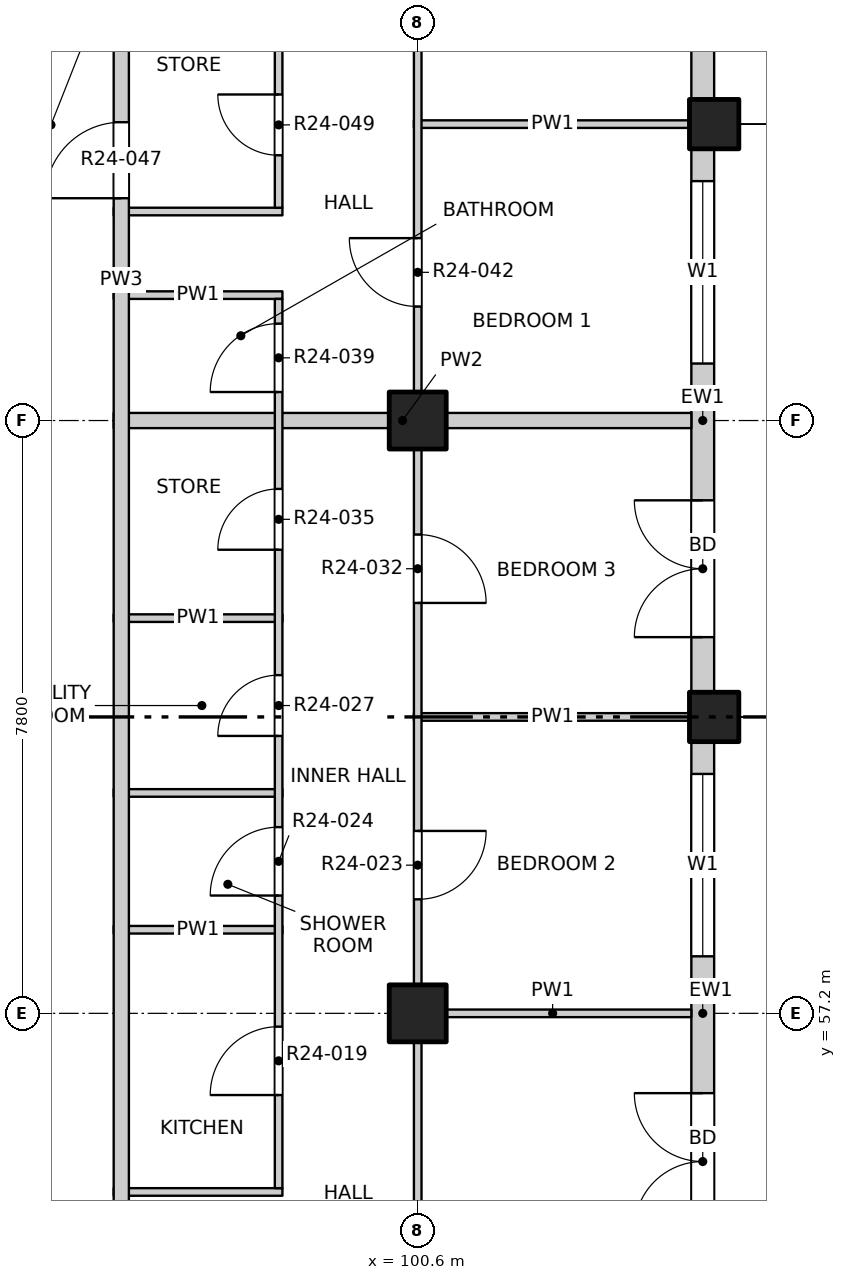
"""IFC4 building model, lengths in metres.
Left out: names, types, materials, properties, quantities, classifications, styles, units other than length and angle.
Written with IfcOpenShell. Run it as: python <this file> out.ifc"""

import sys

from ifc_helpers import new_model, si_unit, direction, frame, frame_2d, origin, origin_2d, place, context, subcontext, project, spatial, rectangle, extrude, element, fill, save


model = new_model("IFC4")
c1 = context("Model", 3, precision=1e-05, world=origin(), true_north=direction((0.0, 1.0)))
c2 = subcontext(c1, "Body", "Model", "MODEL_VIEW")
j1 = project(units=[si_unit("LENGTHUNIT", "METRE"), si_unit("PLANEANGLEUNIT", "RADIAN")], contexts=[c1])
p1 = place(None, origin())
s1 = spatial("IfcSite", under=j1, at=p1, CompositionType="ELEMENT")
p2 = place(p1, origin())
s2 = spatial("IfcBuilding", under=s1, at=p2, CompositionType="ELEMENT")
p3 = place(p2, frame((0.0, 0.0, 246.0)))
s3 = spatial("IfcBuildingStorey", under=s2, at=p3, CompositionType="ELEMENT", Elevation=246.0)
for number, where, z_axis, x_axis in (
    (1, (104.5, 61.1, -0.3), (0.0, 0.0, 1.0), (1.0, 0.0, 0.0)),
    (2, (104.5, 68.9, -0.3), (0.0, 0.0, 1.0), (1.0, 0.0, 0.0)),
):
    element("IfcColumn", number, at=place(p3, frame(where, z_axis=z_axis, x_axis=x_axis)), inside=s3, PredefinedType="COLUMN", context=c2, shape_type="SweptSolid", body=[
        extrude(rectangle(XDim=0.65, YDim=0.65, at=origin_2d()), origin(), (0.0, 0.0, 1.0), 3.45),
    ])
for number, where, z_axis, x_axis in (
    (3, (100.6, 57.2, -0.3), (0.0, 0.0, 1.0), (1.0, 0.0, 0.0)),
    (4, (100.6, 65.0, -0.3), (0.0, 0.0, 1.0), (1.0, 0.0, 0.0)),
):
    element("IfcColumn", number, at=place(p3, frame(where, z_axis=z_axis, x_axis=x_axis)), inside=s3, PredefinedType="COLUMN", context=c2, shape_type="SweptSolid", body=[
        extrude(rectangle(XDim=0.75, YDim=0.75, at=origin_2d()), origin(), (0.0, 0.0, 1.0), 3.45),
    ])
p4 = place(p3, frame((104.35, 53.625, 0.0), z_axis=(0.0, 0.0, 1.0), x_axis=(0.0, 1.0, 0.0)))
e5 = element("IfcWall", 5, at=p4, inside=s3, PredefinedType="SOLIDWALL", context=c2, shape_type="SweptSolid", body=[
    extrude(rectangle(XDim=7.15, YDim=0.3, at=frame_2d((3.575, 0.0))), origin(), (0.0, 0.0, 1.0), 2.7),
])
p5 = place(p4, frame((0.725, 0.0, 0.0)))
e6 = element("IfcOpeningElement", 6, at=p5, cuts=e5, PredefinedType="OPENING", context=c2, shape_type="SweptSolid", body=[
    extrude(rectangle(XDim=1.8, YDim=2.4, at=frame_2d((0.9, 1.2))), frame((0.0, 0.16, 0.0), z_axis=(0.0, -1.0, 0.0), x_axis=(1.0, 0.0, 0.0)), (0.0, 0.0, 1.0), 0.32),
])
p6 = place(p4, frame((4.325, 0.0, 0.9)))
e7 = element("IfcOpeningElement", 7, at=p6, cuts=e5, PredefinedType="OPENING", context=c2, shape_type="SweptSolid", body=[
    extrude(rectangle(XDim=2.4, YDim=1.8, at=frame_2d((1.2, 0.9))), frame((0.0, 0.16, 0.0), z_axis=(0.0, -1.0, 0.0), x_axis=(1.0, 0.0, 0.0)), (0.0, 0.0, 1.0), 0.32),
])
p7 = place(p3, frame((104.35, 61.425, 0.0), z_axis=(0.0, 0.0, 1.0), x_axis=(0.0, 1.0, 0.0)))
e8 = element("IfcWall", 8, at=p7, inside=s3, PredefinedType="SOLIDWALL", context=c2, shape_type="SweptSolid", body=[
    extrude(rectangle(XDim=7.15, YDim=0.3, at=frame_2d((3.575, 0.0))), origin(), (0.0, 0.0, 1.0), 2.7),
])
p8 = place(p7, frame((0.725, 0.0, 0.0)))
e9 = element("IfcOpeningElement", 9, at=p8, cuts=e8, PredefinedType="OPENING", context=c2, shape_type="SweptSolid", body=[
    extrude(rectangle(XDim=1.8, YDim=2.4, at=frame_2d((0.9, 1.2))), frame((0.0, 0.16, 0.0), z_axis=(0.0, -1.0, 0.0), x_axis=(1.0, 0.0, 0.0)), (0.0, 0.0, 1.0), 0.32),
])
p9 = place(p7, frame((4.325, 0.0, 0.9)))
e10 = element("IfcOpeningElement", 10, at=p9, cuts=e8, PredefinedType="OPENING", context=c2, shape_type="SweptSolid", body=[
    extrude(rectangle(XDim=2.4, YDim=1.8, at=frame_2d((1.2, 0.9))), frame((0.0, 0.16, 0.0), z_axis=(0.0, -1.0, 0.0), x_axis=(1.0, 0.0, 0.0)), (0.0, 0.0, 1.0), 0.32),
])
p10 = place(p3, frame((104.35, 69.225, 0.0), z_axis=(0.0, 0.0, 1.0), x_axis=(0.0, 1.0, 0.0)))
e11 = element("IfcWall", 11, at=p10, inside=s3, PredefinedType="SOLIDWALL", context=c2, shape_type="SweptSolid", body=[
    extrude(rectangle(XDim=7.15, YDim=0.3, at=frame_2d((3.575, 0.0))), origin(), (0.0, 0.0, 1.0), 2.7),
])
p11 = place(p10, frame((0.725, 0.0, 0.0)))
e12 = element("IfcOpeningElement", 12, at=p11, cuts=e11, PredefinedType="OPENING", context=c2, shape_type="SweptSolid", body=[
    extrude(rectangle(XDim=1.8, YDim=2.4, at=frame_2d((0.9, 1.2))), frame((0.0, 0.16, 0.0), z_axis=(0.0, -1.0, 0.0), x_axis=(1.0, 0.0, 0.0)), (0.0, 0.0, 1.0), 0.32),
])
p12 = place(p10, frame((4.325, 0.0, 0.9)))
e13 = element("IfcOpeningElement", 13, at=p12, cuts=e11, PredefinedType="OPENING", context=c2, shape_type="SweptSolid", body=[
    extrude(rectangle(XDim=2.4, YDim=1.8, at=frame_2d((1.2, 0.9))), frame((0.0, 0.16, 0.0), z_axis=(0.0, -1.0, 0.0), x_axis=(1.0, 0.0, 0.0)), (0.0, 0.0, 1.0), 0.32),
])
p13 = place(p3, frame((96.6, 54.85, 0.0), z_axis=(0.0, 0.0, 1.0), x_axis=(1.0, 0.0, 0.0)))
e14 = element("IfcWall", 14, at=p13, inside=s3, PredefinedType="PARTITIONING", context=c2, shape_type="SweptSolid", body=[
    extrude(rectangle(XDim=2.22, YDim=0.1, at=frame_2d((1.11, 0.0))), origin(), (0.0, 0.0, 1.0), 3.15),
])
p14 = place(p3, frame((100.55, 57.2, 0.0), z_axis=(0.0, 0.0, 1.0), x_axis=(1.0, 0.0, 0.0)))
e15 = element("IfcWall", 15, at=p14, inside=s3, PredefinedType="PARTITIONING", context=c2, shape_type="SweptSolid", body=[
    extrude(rectangle(XDim=3.65, YDim=0.1, at=frame_2d((1.825, 0.0))), origin(), (0.0, 0.0, 1.0), 3.15),
])
for number, where, z_axis, x_axis in (
    (16, (96.6, 58.3, 0.0), (0.0, 0.0, 1.0), (1.0, 0.0, 0.0)),
    (17, (96.6, 60.1, 0.0), (0.0, 0.0, 1.0), (1.0, 0.0, 0.0)),
):
    element("IfcWall", number, at=place(p3, frame(where, z_axis=z_axis, x_axis=x_axis)), inside=s3, PredefinedType="PARTITIONING", context=c2, shape_type="SweptSolid", body=[
        extrude(rectangle(XDim=2.22, YDim=0.1, at=frame_2d((1.11, 0.0))), origin(), (0.0, 0.0, 1.0), 3.15),
    ])
p15 = place(p3, frame((100.55, 61.1, 0.0), z_axis=(0.0, 0.0, 1.0), x_axis=(1.0, 0.0, 0.0)))
e18 = element("IfcWall", 18, at=p15, inside=s3, PredefinedType="PARTITIONING", context=c2, shape_type="SweptSolid", body=[
    extrude(rectangle(XDim=3.65, YDim=0.1, at=frame_2d((1.825, 0.0))), origin(), (0.0, 0.0, 1.0), 2.55),
])
p16 = place(p3, frame((96.6, 62.4, 0.0), z_axis=(0.0, 0.0, 1.0), x_axis=(1.0, 0.0, 0.0)))
e19 = element("IfcWall", 19, at=p16, inside=s3, PredefinedType="PARTITIONING", context=c2, shape_type="SweptSolid", body=[
    extrude(rectangle(XDim=2.22, YDim=0.1, at=frame_2d((1.11, 0.0))), origin(), (0.0, 0.0, 1.0), 3.15),
])
p17 = place(p3, frame((96.6, 65.0, 0.0), z_axis=(0.0, 0.0, 1.0), x_axis=(1.0, 0.0, 0.0)))
e20 = element("IfcWall", 20, at=p17, inside=s3, PredefinedType="PARTITIONING", context=c2, shape_type="SweptSolid", body=[
    extrude(rectangle(XDim=7.6, YDim=0.2, at=frame_2d((3.8, 0.0))), origin(), (0.0, 0.0, 1.0), 3.15),
])
for number, where, z_axis, x_axis in (
    (21, (96.6, 66.65, 0.0), (0.0, 0.0, 1.0), (1.0, 0.0, 0.0)),
    (22, (96.6, 67.75, 0.0), (0.0, 0.0, 1.0), (1.0, 0.0, 0.0)),
):
    element("IfcWall", number, at=place(p3, frame(where, z_axis=z_axis, x_axis=x_axis)), inside=s3, PredefinedType="PARTITIONING", context=c2, shape_type="SweptSolid", body=[
        extrude(rectangle(XDim=2.22, YDim=0.1, at=frame_2d((1.11, 0.0))), origin(), (0.0, 0.0, 1.0), 3.15),
    ])
p18 = place(p3, frame((100.55, 68.9, 0.0), z_axis=(0.0, 0.0, 1.0), x_axis=(1.0, 0.0, 0.0)))
e23 = element("IfcWall", 23, at=p18, inside=s3, PredefinedType="PARTITIONING", context=c2, shape_type="SweptSolid", body=[
    extrude(rectangle(XDim=3.65, YDim=0.1, at=frame_2d((1.825, 0.0))), origin(), (0.0, 0.0, 1.0), 2.55),
])
p19 = place(p3, frame((96.7, 49.5, 0.0), z_axis=(0.0, 0.0, 1.0), x_axis=(0.0, 1.0, 0.0)))
e24 = element("IfcWall", 24, at=p19, inside=s3, PredefinedType="PARTITIONING", context=c2, shape_type="SweptSolid", body=[
    extrude(rectangle(XDim=34.7, YDim=0.2, at=frame_2d((17.35, 0.0))), origin(), (0.0, 0.0, 1.0), 3.15),
])
p20 = place(p19, frame((3.075, 0.0, 0.0)))
e25 = element("IfcOpeningElement", 25, at=p20, cuts=e24, PredefinedType="OPENING", context=c2, shape_type="SweptSolid", body=[
    extrude(rectangle(XDim=1.0, YDim=2.1, at=frame_2d((0.5, 1.05))), frame((0.0, 0.11, 0.0), z_axis=(0.0, -1.0, 0.0), x_axis=(1.0, 0.0, 0.0)), (0.0, 0.0, 1.0), 0.22),
])
p21 = place(p19, frame((18.425, 0.0, 0.0)))
e26 = element("IfcOpeningElement", 26, at=p21, cuts=e24, PredefinedType="OPENING", context=c2, shape_type="SweptSolid", body=[
    extrude(rectangle(XDim=1.0, YDim=2.1, at=frame_2d((0.5, 1.05))), frame((0.0, 0.11, 0.0), z_axis=(0.0, -1.0, 0.0), x_axis=(1.0, 0.0, 0.0)), (0.0, 0.0, 1.0), 0.22),
])
p22 = place(p19, frame((25.825, 0.0, 0.0)))
e27 = element("IfcOpeningElement", 27, at=p22, cuts=e24, PredefinedType="OPENING", context=c2, shape_type="SweptSolid", body=[
    extrude(rectangle(XDim=1.0, YDim=2.1, at=frame_2d((0.5, 1.05))), frame((0.0, 0.11, 0.0), z_axis=(0.0, -1.0, 0.0), x_axis=(1.0, 0.0, 0.0)), (0.0, 0.0, 1.0), 0.22),
])
p23 = place(p3, frame((98.77, 54.9, 0.0), z_axis=(0.0, 0.0, 1.0), x_axis=(0.0, 1.0, 0.0)))
e28 = element("IfcWall", 28, at=p23, inside=s3, PredefinedType="PARTITIONING", context=c2, shape_type="SweptSolid", body=[
    extrude(rectangle(XDim=11.7, YDim=0.1, at=frame_2d((5.85, 0.0))), origin(), (0.0, 0.0, 1.0), 3.15),
])
p24 = place(p23, frame((1.225, 0.0, 0.0)))
e29 = element("IfcOpeningElement", 29, at=p24, cuts=e28, PredefinedType="OPENING", context=c2, shape_type="SweptSolid", body=[
    extrude(rectangle(XDim=0.9, YDim=2.1, at=frame_2d((0.45, 1.05))), frame((0.0, 0.06, 0.0), z_axis=(0.0, -1.0, 0.0), x_axis=(1.0, 0.0, 0.0)), (0.0, 0.0, 1.0), 0.12),
])
p25 = place(p23, frame((3.85, 0.0, 0.0)))
e30 = element("IfcOpeningElement", 30, at=p25, cuts=e28, PredefinedType="OPENING", context=c2, shape_type="SweptSolid", body=[
    extrude(rectangle(XDim=0.9, YDim=2.1, at=frame_2d((0.45, 1.05))), frame((0.0, 0.06, 0.0), z_axis=(0.0, -1.0, 0.0), x_axis=(1.0, 0.0, 0.0)), (0.0, 0.0, 1.0), 0.12),
])
p26 = place(p23, frame((5.95, 0.0, 0.0)))
e31 = element("IfcOpeningElement", 31, at=p26, cuts=e28, PredefinedType="OPENING", context=c2, shape_type="SweptSolid", body=[
    extrude(rectangle(XDim=0.8, YDim=2.1, at=frame_2d((0.4, 1.05))), frame((0.0, 0.06, 0.0), z_axis=(0.0, -1.0, 0.0), x_axis=(1.0, 0.0, 0.0)), (0.0, 0.0, 1.0), 0.12),
])
p27 = place(p23, frame((8.4, 0.0, 0.0)))
e32 = element("IfcOpeningElement", 32, at=p27, cuts=e28, PredefinedType="OPENING", context=c2, shape_type="SweptSolid", body=[
    extrude(rectangle(XDim=0.8, YDim=2.1, at=frame_2d((0.4, 1.05))), frame((0.0, 0.06, 0.0), z_axis=(0.0, -1.0, 0.0), x_axis=(1.0, 0.0, 0.0)), (0.0, 0.0, 1.0), 0.12),
])
p28 = place(p23, frame((10.475, 0.0, 0.0)))
e33 = element("IfcOpeningElement", 33, at=p28, cuts=e28, PredefinedType="OPENING", context=c2, shape_type="SweptSolid", body=[
    extrude(rectangle(XDim=0.9, YDim=2.1, at=frame_2d((0.45, 1.05))), frame((0.0, 0.06, 0.0), z_axis=(0.0, -1.0, 0.0), x_axis=(1.0, 0.0, 0.0)), (0.0, 0.0, 1.0), 0.12),
])
p29 = place(p3, frame((98.77, 67.8, 0.0), z_axis=(0.0, 0.0, 1.0), x_axis=(0.0, 1.0, 0.0)))
e34 = element("IfcWall", 34, at=p29, inside=s3, PredefinedType="PARTITIONING", context=c2, shape_type="SweptSolid", body=[
    extrude(rectangle(XDim=6.2, YDim=0.1, at=frame_2d((3.1, 0.0))), origin(), (0.0, 0.0, 1.0), 3.15),
])
p30 = place(p29, frame((0.69, 0.0, 0.0)))
e35 = element("IfcOpeningElement", 35, at=p30, cuts=e34, PredefinedType="OPENING", context=c2, shape_type="SweptSolid", body=[
    extrude(rectangle(XDim=0.8, YDim=2.1, at=frame_2d((0.4, 1.05))), frame((0.0, 0.06, 0.0), z_axis=(0.0, -1.0, 0.0), x_axis=(1.0, 0.0, 0.0)), (0.0, 0.0, 1.0), 0.12),
])
p31 = place(p29, frame((3.165, 0.0, 0.0)))
e36 = element("IfcOpeningElement", 36, at=p31, cuts=e34, PredefinedType="OPENING", context=c2, shape_type="SweptSolid", body=[
    extrude(rectangle(XDim=0.9, YDim=2.1, at=frame_2d((0.45, 1.05))), frame((0.0, 0.06, 0.0), z_axis=(0.0, -1.0, 0.0), x_axis=(1.0, 0.0, 0.0)), (0.0, 0.0, 1.0), 0.12),
])
p32 = place(p29, frame((5.225, 0.0, 0.0)))
e37 = element("IfcOpeningElement", 37, at=p32, cuts=e34, PredefinedType="OPENING", context=c2, shape_type="SweptSolid", body=[
    extrude(rectangle(XDim=0.8, YDim=2.1, at=frame_2d((0.4, 1.05))), frame((0.0, 0.06, 0.0), z_axis=(0.0, -1.0, 0.0), x_axis=(1.0, 0.0, 0.0)), (0.0, 0.0, 1.0), 0.12),
])
p33 = place(p3, frame((100.6, 45.8, 0.0), z_axis=(0.0, 0.0, 1.0), x_axis=(0.0, 1.0, 0.0)))
e38 = element("IfcWall", 38, at=p33, inside=s3, PredefinedType="PARTITIONING", context=c2, shape_type="SweptSolid", body=[
    extrude(rectangle(XDim=38.4, YDim=0.1, at=frame_2d((19.2, 0.0))), origin(), (0.0, 0.0, 1.0), 3.15),
])
p34 = place(p33, frame((1.05, 0.0, 0.0)))
e39 = element("IfcOpeningElement", 39, at=p34, cuts=e38, PredefinedType="OPENING", context=c2, shape_type="SweptSolid", body=[
    extrude(rectangle(XDim=1.2, YDim=2.1, at=frame_2d((0.6, 1.05))), frame((0.0, 0.06, 0.0), z_axis=(0.0, -1.0, 0.0), x_axis=(1.0, 0.0, 0.0)), (0.0, 0.0, 1.0), 0.12),
])
p35 = place(p33, frame((6.9, 0.0, 0.0)))
e40 = element("IfcOpeningElement", 40, at=p35, cuts=e38, PredefinedType="OPENING", context=c2, shape_type="SweptSolid", body=[
    extrude(rectangle(XDim=1.2, YDim=2.1, at=frame_2d((0.6, 1.05))), frame((0.0, 0.06, 0.0), z_axis=(0.0, -1.0, 0.0), x_axis=(1.0, 0.0, 0.0)), (0.0, 0.0, 1.0), 0.12),
])
p36 = place(p33, frame((12.9, 0.0, 0.0)))
e41 = element("IfcOpeningElement", 41, at=p36, cuts=e38, PredefinedType="OPENING", context=c2, shape_type="SweptSolid", body=[
    extrude(rectangle(XDim=0.9, YDim=2.1, at=frame_2d((0.45, 1.05))), frame((0.0, 0.06, 0.0), z_axis=(0.0, -1.0, 0.0), x_axis=(1.0, 0.0, 0.0)), (0.0, 0.0, 1.0), 0.12),
])
p37 = place(p33, frame((16.8, 0.0, 0.0)))
e42 = element("IfcOpeningElement", 42, at=p37, cuts=e38, PredefinedType="OPENING", context=c2, shape_type="SweptSolid", body=[
    extrude(rectangle(XDim=0.9, YDim=2.1, at=frame_2d((0.45, 1.05))), frame((0.0, 0.06, 0.0), z_axis=(0.0, -1.0, 0.0), x_axis=(1.0, 0.0, 0.0)), (0.0, 0.0, 1.0), 0.12),
])
p38 = place(p33, frame((20.7, 0.0, 0.0)))
e43 = element("IfcOpeningElement", 43, at=p38, cuts=e38, PredefinedType="OPENING", context=c2, shape_type="SweptSolid", body=[
    extrude(rectangle(XDim=0.9, YDim=2.1, at=frame_2d((0.45, 1.05))), frame((0.0, 0.06, 0.0), z_axis=(0.0, -1.0, 0.0), x_axis=(1.0, 0.0, 0.0)), (0.0, 0.0, 1.0), 0.12),
])
p39 = place(p33, frame((24.6, 0.0, 0.0)))
e44 = element("IfcOpeningElement", 44, at=p39, cuts=e38, PredefinedType="OPENING", context=c2, shape_type="SweptSolid", body=[
    extrude(rectangle(XDim=0.9, YDim=2.1, at=frame_2d((0.45, 1.05))), frame((0.0, 0.06, 0.0), z_axis=(0.0, -1.0, 0.0), x_axis=(1.0, 0.0, 0.0)), (0.0, 0.0, 1.0), 0.12),
])
p40 = place(p33, frame((30.3, 0.0, 0.0)))
e45 = element("IfcOpeningElement", 45, at=p40, cuts=e38, PredefinedType="OPENING", context=c2, shape_type="SweptSolid", body=[
    extrude(rectangle(XDim=1.2, YDim=2.1, at=frame_2d((0.6, 1.05))), frame((0.0, 0.06, 0.0), z_axis=(0.0, -1.0, 0.0), x_axis=(1.0, 0.0, 0.0)), (0.0, 0.0, 1.0), 0.12),
])
p41 = place(p33, frame((36.15, 0.0, 0.0)))
e46 = element("IfcOpeningElement", 46, at=p41, cuts=e38, PredefinedType="OPENING", context=c2, shape_type="SweptSolid", body=[
    extrude(rectangle(XDim=1.2, YDim=2.1, at=frame_2d((0.6, 1.05))), frame((0.0, 0.06, 0.0), z_axis=(0.0, -1.0, 0.0), x_axis=(1.0, 0.0, 0.0)), (0.0, 0.0, 1.0), 0.12),
])
p42 = place(p5, origin())
e47 = element("IfcDoor", 47, at=p42, inside=s3, OperationType="DOUBLE_DOOR_SINGLE_SWING", PredefinedType="DOOR", context=c2, shape_type="SweptSolid", body=[
    extrude(rectangle(XDim=1.8, YDim=2.4, at=frame_2d((0.9, 1.2))), frame((0.0, 0.025, 0.0), z_axis=(0.0, -1.0, 0.0), x_axis=(1.0, 0.0, 0.0)), (0.0, 0.0, 1.0), 0.05),
])
fill(e6, e47)
p43 = place(p6, origin())
e48 = element("IfcWindow", 48, at=p43, inside=s3, PartitioningType="DOUBLE_PANEL_VERTICAL", PredefinedType="WINDOW", context=c2, shape_type="SweptSolid", body=[
    extrude(rectangle(XDim=2.4, YDim=1.8, at=frame_2d((1.2, 0.9))), frame((0.0, 0.03, 0.0), z_axis=(0.0, -1.0, 0.0), x_axis=(1.0, 0.0, 0.0)), (0.0, 0.0, 1.0), 0.06),
])
fill(e7, e48)
p44 = place(p8, origin())
e49 = element("IfcDoor", 49, at=p44, inside=s3, OperationType="DOUBLE_DOOR_SINGLE_SWING", PredefinedType="DOOR", context=c2, shape_type="SweptSolid", body=[
    extrude(rectangle(XDim=1.8, YDim=2.4, at=frame_2d((0.9, 1.2))), frame((0.0, 0.025, 0.0), z_axis=(0.0, -1.0, 0.0), x_axis=(1.0, 0.0, 0.0)), (0.0, 0.0, 1.0), 0.05),
])
fill(e9, e49)
p45 = place(p9, origin())
e50 = element("IfcWindow", 50, at=p45, inside=s3, PartitioningType="DOUBLE_PANEL_VERTICAL", PredefinedType="WINDOW", context=c2, shape_type="SweptSolid", body=[
    extrude(rectangle(XDim=2.4, YDim=1.8, at=frame_2d((1.2, 0.9))), frame((0.0, 0.03, 0.0), z_axis=(0.0, -1.0, 0.0), x_axis=(1.0, 0.0, 0.0)), (0.0, 0.0, 1.0), 0.06),
])
fill(e10, e50)
p46 = place(p24, origin())
e51 = element("IfcDoor", 51, at=p46, inside=s3, OperationType="SINGLE_SWING_LEFT", PredefinedType="DOOR", context=c2, shape_type="SweptSolid", body=[
    extrude(rectangle(XDim=0.9, YDim=2.1, at=frame_2d((0.45, 1.05))), frame((0.0, 0.025, 0.0), z_axis=(0.0, -1.0, 0.0), x_axis=(1.0, 0.0, 0.0)), (0.0, 0.0, 1.0), 0.05),
])
fill(e29, e51)
p47 = place(p36, origin())
e52 = element("IfcDoor", 52, at=p47, inside=s3, OperationType="SINGLE_SWING_LEFT", PredefinedType="DOOR", context=c2, shape_type="SweptSolid", body=[
    extrude(rectangle(XDim=0.9, YDim=2.1, at=frame_2d((0.45, 1.05))), frame((0.0, 0.025, 0.0), z_axis=(0.0, -1.0, 0.0), x_axis=(1.0, 0.0, 0.0)), (0.0, 0.0, 1.0), 0.05),
])
fill(e41, e52)
p48 = place(p25, origin())
e53 = element("IfcDoor", 53, at=p48, inside=s3, OperationType="SINGLE_SWING_LEFT", PredefinedType="DOOR", context=c2, shape_type="SweptSolid", body=[
    extrude(rectangle(XDim=0.9, YDim=2.1, at=frame_2d((0.45, 1.05))), frame((0.0, 0.025, 0.0), z_axis=(0.0, -1.0, 0.0), x_axis=(1.0, 0.0, 0.0)), (0.0, 0.0, 1.0), 0.05),
])
fill(e30, e53)
p49 = place(p26, origin())
e54 = element("IfcDoor", 54, at=p49, inside=s3, OperationType="SINGLE_SWING_LEFT", PredefinedType="DOOR", context=c2, shape_type="SweptSolid", body=[
    extrude(rectangle(XDim=0.8, YDim=2.1, at=frame_2d((0.4, 1.05))), frame((0.0, 0.025, 0.0), z_axis=(0.0, -1.0, 0.0), x_axis=(1.0, 0.0, 0.0)), (0.0, 0.0, 1.0), 0.05),
])
fill(e31, e54)
p50 = place(p37, origin())
e55 = element("IfcDoor", 55, at=p50, inside=s3, OperationType="SINGLE_SWING_RIGHT", PredefinedType="DOOR", context=c2, shape_type="SweptSolid", body=[
    extrude(rectangle(XDim=0.9, YDim=2.1, at=frame_2d((0.45, 1.05))), frame((0.0, 0.025, 0.0), z_axis=(0.0, -1.0, 0.0), x_axis=(1.0, 0.0, 0.0)), (0.0, 0.0, 1.0), 0.05),
])
fill(e42, e55)
p51 = place(p27, origin())
e56 = element("IfcDoor", 56, at=p51, inside=s3, OperationType="SINGLE_SWING_LEFT", PredefinedType="DOOR", context=c2, shape_type="SweptSolid", body=[
    extrude(rectangle(XDim=0.8, YDim=2.1, at=frame_2d((0.4, 1.05))), frame((0.0, 0.025, 0.0), z_axis=(0.0, -1.0, 0.0), x_axis=(1.0, 0.0, 0.0)), (0.0, 0.0, 1.0), 0.05),
])
fill(e32, e56)
p52 = place(p28, origin())
e57 = element("IfcDoor", 57, at=p52, inside=s3, OperationType="SINGLE_SWING_LEFT", PredefinedType="DOOR", context=c2, shape_type="SweptSolid", body=[
    extrude(rectangle(XDim=0.9, YDim=2.1, at=frame_2d((0.45, 1.05))), frame((0.0, 0.025, 0.0), z_axis=(0.0, -1.0, 0.0), x_axis=(1.0, 0.0, 0.0)), (0.0, 0.0, 1.0), 0.05),
])
fill(e33, e57)
p53 = place(p38, origin())
e58 = element("IfcDoor", 58, at=p53, inside=s3, OperationType="SINGLE_SWING_RIGHT", PredefinedType="DOOR", context=c2, shape_type="SweptSolid", body=[
    extrude(rectangle(XDim=0.9, YDim=2.1, at=frame_2d((0.45, 1.05))), frame((0.0, 0.025, 0.0), z_axis=(0.0, -1.0, 0.0), x_axis=(1.0, 0.0, 0.0)), (0.0, 0.0, 1.0), 0.05),
])
fill(e43, e58)
p54 = place(p21, origin())
e59 = element("IfcDoor", 59, at=p54, inside=s3, OperationType="SINGLE_SWING_LEFT", PredefinedType="DOOR", context=c2, shape_type="SweptSolid", body=[
    extrude(rectangle(XDim=1.0, YDim=2.1, at=frame_2d((0.5, 1.05))), frame((0.0, 0.025, 0.0), z_axis=(0.0, -1.0, 0.0), x_axis=(1.0, 0.0, 0.0)), (0.0, 0.0, 1.0), 0.05),
])
fill(e26, e59)
p55 = place(p30, origin())
e60 = element("IfcDoor", 60, at=p55, inside=s3, OperationType="SINGLE_SWING_RIGHT", PredefinedType="DOOR", context=c2, shape_type="SweptSolid", body=[
    extrude(rectangle(XDim=0.8, YDim=2.1, at=frame_2d((0.4, 1.05))), frame((0.0, 0.025, 0.0), z_axis=(0.0, -1.0, 0.0), x_axis=(1.0, 0.0, 0.0)), (0.0, 0.0, 1.0), 0.05),
])
fill(e35, e60)
save(model, sys.argv[1])
